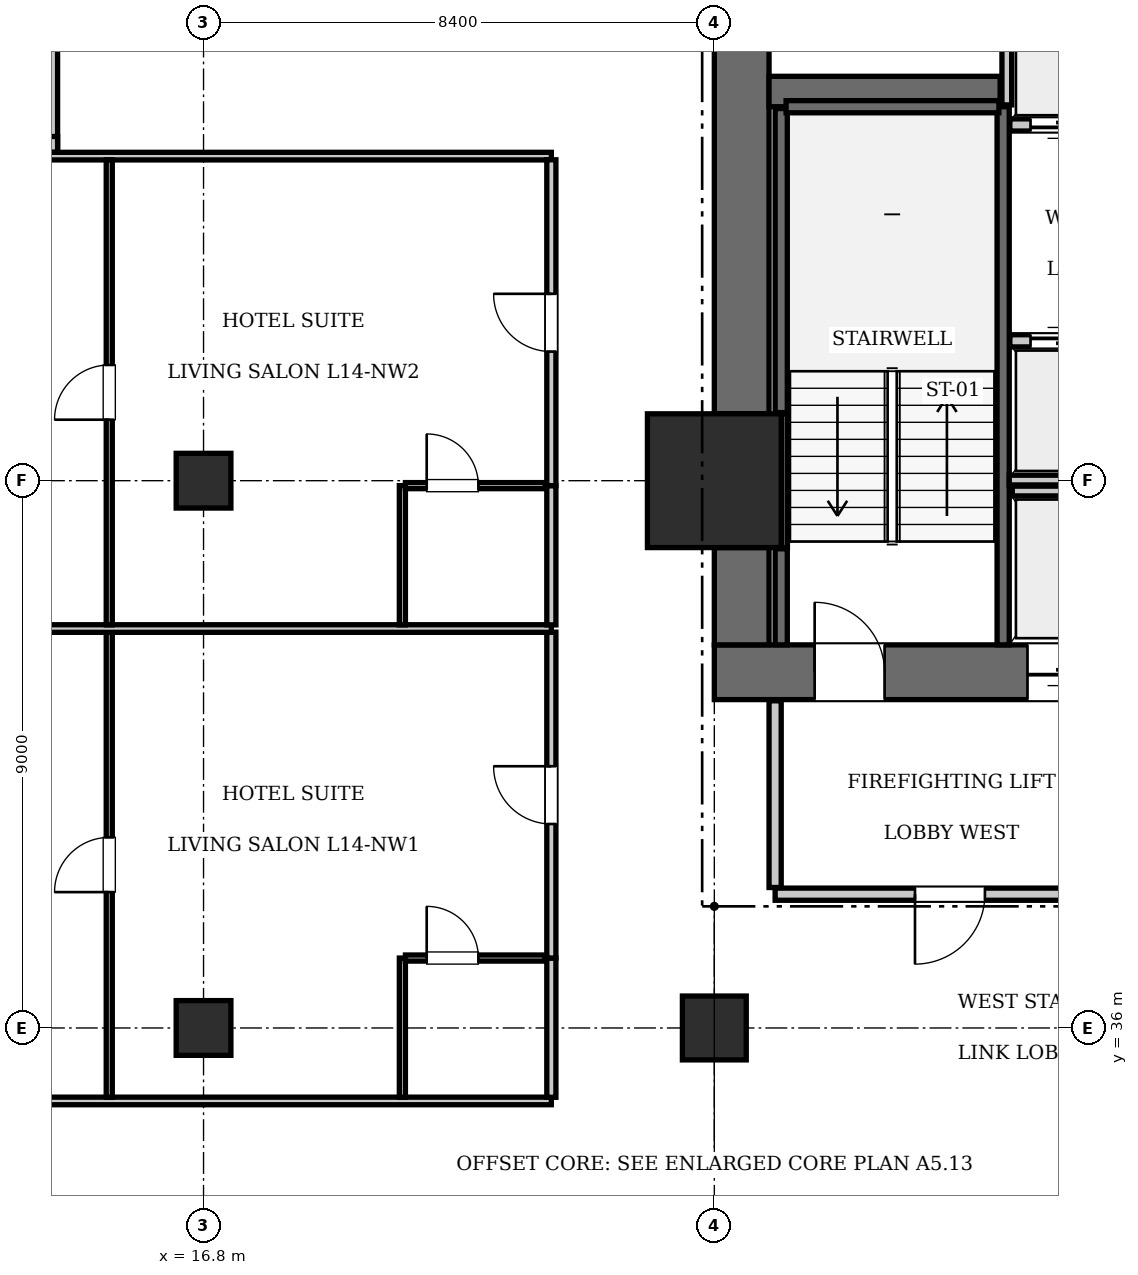
"""IFC4 building model, lengths in metres.
Left out: names, types, materials, properties, quantities, classifications, styles, units other than length and angle.
Written with IfcOpenShell. Run it as: python <this file> out.ifc"""

import sys

from ifc_helpers import new_model, si_unit, direction, frame, frame_2d, origin, origin_2d, place, context, subcontext, project, spatial, rectangle, extrude, element, fill, save


model = new_model("IFC4")
c1 = context("Model", 3, precision=1e-05, world=origin(), true_north=direction((0.0, 1.0)))
c2 = subcontext(c1, "Body", "Model", "MODEL_VIEW")
j1 = project(units=[si_unit("LENGTHUNIT", "METRE"), si_unit("PLANEANGLEUNIT", "RADIAN")], contexts=[c1])
p1 = place(None, origin())
s1 = spatial("IfcSite", under=j1, at=p1, CompositionType="ELEMENT")
p2 = place(p1, origin())
s2 = spatial("IfcBuilding", under=s1, at=p2, CompositionType="ELEMENT")
p3 = place(p2, frame((0.0, 0.0, 61.6)))
s3 = spatial("IfcBuildingStorey", under=s2, at=p3, CompositionType="ELEMENT", Elevation=61.6)
p4 = place(p3, frame((25.2, 45.0, 0.0), z_axis=(0.0, 0.0, 1.0), x_axis=(1.0, 0.0, 0.0)))
e1 = element("IfcColumn", 1, at=p4, inside=s3, PredefinedType="COLUMN", context=c2, shape_type="SweptSolid", body=[
    extrude(rectangle(XDim=2.2, YDim=2.2, at=origin_2d()), origin(), (0.0, 0.0, 1.0), 3.85),
])
p5 = place(p3, frame((25.2, 41.85, 0.0), z_axis=(0.0, 0.0, 1.0), x_axis=(1.0, 0.0, 0.0)))
e2 = element("IfcWall", 2, at=p5, inside=s3, PredefinedType="SHEAR", context=c2, shape_type="SweptSolid", body=[
    extrude(rectangle(XDim=6.8, YDim=0.9, at=frame_2d((3.4, 0.0))), origin(), (0.0, 0.0, 1.0), 3.85),
])
p6 = place(p5, frame((1.65, 0.0, 0.0)))
e3 = element("IfcOpeningElement", 3, at=p6, cuts=e2, PredefinedType="OPENING", context=c2, shape_type="SweptSolid", body=[
    extrude(rectangle(XDim=1.15, YDim=2.15, at=frame_2d((0.575, 1.075))), frame((0.0, 0.46, 0.0), z_axis=(0.0, -1.0, 0.0), x_axis=(1.0, 0.0, 0.0)), (0.0, 0.0, 1.0), 0.92),
])
p7 = place(p5, frame((5.15, 0.0, 0.0)))
e4 = element("IfcOpeningElement", 4, at=p7, cuts=e2, PredefinedType="OPENING", context=c2, shape_type="SweptSolid", body=[
    extrude(rectangle(XDim=1.1, YDim=2.2, at=frame_2d((0.55, 1.1))), frame((0.0, 0.46, 0.0), z_axis=(0.0, -1.0, 0.0), x_axis=(1.0, 0.0, 0.0)), (0.0, 0.0, 1.0), 0.92),
])
p8 = place(p3, frame((25.65, 42.3, 0.0), z_axis=(0.0, 0.0, 1.0), x_axis=(0.0, 1.0, 0.0)))
e5 = element("IfcWall", 5, at=p8, inside=s3, PredefinedType="SHEAR", context=c2, shape_type="SweptSolid", body=[
    extrude(rectangle(XDim=1.6, YDim=0.9, at=frame_2d((0.8, 0.0))), origin(), (0.0, 0.0, 1.0), 3.85),
])
p9 = place(p3, frame((25.65, 46.1, 0.0), z_axis=(0.0, 0.0, 1.0), x_axis=(0.0, 1.0, 0.0)))
e6 = element("IfcWall", 6, at=p9, inside=s3, PredefinedType="SHEAR", context=c2, shape_type="SweptSolid", body=[
    extrude(rectangle(XDim=7.0, YDim=0.9, at=frame_2d((3.5, 0.0))), origin(), (0.0, 0.0, 1.0), 3.85),
])
p10 = place(p3, frame((26.1, 51.4, 0.0), z_axis=(0.0, 0.0, 1.0), x_axis=(1.0, 0.0, 0.0)))
e7 = element("IfcWall", 7, at=p10, inside=s3, PredefinedType="SHEAR", context=c2, shape_type="SweptSolid", body=[
    extrude(rectangle(XDim=3.8, YDim=0.5, at=frame_2d((1.9, 0.0))), origin(), (0.0, 0.0, 1.0), 3.85),
])
p11 = place(p3, frame((25.2, 36.0, 0.0), z_axis=(0.0, 0.0, 1.0), x_axis=(1.0, 0.0, 0.0)))
e8 = element("IfcColumn", 8, at=p11, inside=s3, PredefinedType="COLUMN", context=c2, shape_type="SweptSolid", body=[
    extrude(rectangle(XDim=1.05, YDim=1.05, at=origin_2d()), origin(), (0.0, 0.0, 1.0), 3.85),
])
for number, where, z_axis, x_axis in (
    (9, (16.8, 36.0, 0.0), (0.0, 0.0, 1.0), (1.0, 0.0, 0.0)),
    (10, (16.8, 45.0, 0.0), (0.0, 0.0, 1.0), (1.0, 0.0, 0.0)),
):
    element("IfcColumn", number, at=place(p3, frame(where, z_axis=z_axis, x_axis=x_axis)), inside=s3, PredefinedType="COLUMN", context=c2, shape_type="SweptSolid", body=[
        extrude(rectangle(XDim=0.9, YDim=0.9, at=origin_2d()), origin(), (0.0, 0.0, 1.0), 3.85),
    ])
p12 = place(p3, frame((29.95, 42.3, 0.0), z_axis=(0.0, 0.0, 1.0), x_axis=(0.0, 1.0, 0.0)))
e11 = element("IfcWall", 11, at=p12, inside=s3, PredefinedType="SOLIDWALL", context=c2, shape_type="SweptSolid", body=[
    extrude(rectangle(XDim=8.85, YDim=0.2, at=frame_2d((4.425, 0.0))), origin(), (0.0, 0.0, 1.0), 3.61),
])
p13 = place(p3, frame((26.3, 42.3, 0.0), z_axis=(0.0, 0.0, 1.0), x_axis=(0.0, 1.0, 0.0)))
e12 = element("IfcWall", 12, at=p13, inside=s3, PredefinedType="SOLIDWALL", context=c2, shape_type="SweptSolid", body=[
    extrude(rectangle(XDim=1.58, YDim=0.2, at=frame_2d((0.79, 0.0))), origin(), (0.0, 0.0, 1.0), 3.61),
])
p14 = place(p3, frame((26.3, 46.12, 0.0), z_axis=(0.0, 0.0, 1.0), x_axis=(0.0, 1.0, 0.0)))
e13 = element("IfcWall", 13, at=p14, inside=s3, PredefinedType="SOLIDWALL", context=c2, shape_type="SweptSolid", body=[
    extrude(rectangle(XDim=5.0, YDim=0.2, at=frame_2d((2.5, 0.0))), origin(), (0.0, 0.0, 1.0), 3.61),
])
p15 = place(p3, frame((26.38, 51.15, 0.0), z_axis=(0.0, 0.0, 1.0), x_axis=(1.0, 0.0, 0.0)))
e14 = element("IfcWall", 14, at=p15, inside=s3, PredefinedType="SOLIDWALL", context=c2, shape_type="SweptSolid", body=[
    extrude(rectangle(XDim=3.5, YDim=0.2, at=frame_2d((1.75, 0.0))), origin(), (0.0, 0.0, 1.0), 3.61),
])
p16 = place(p3, frame((26.352, 43.9, 0.0), z_axis=(0.0, 0.0, 1.0), x_axis=(0.0, 1.0, 0.0)))
e15 = element("IfcWall", 15, at=p16, inside=s3, PredefinedType="SOLIDWALL", context=c2, shape_type="SweptSolid", body=[
    extrude(rectangle(XDim=2.2, YDim=0.1, at=frame_2d((1.1, 0.0))), origin(), (0.0, 0.0, 1.0), 3.61),
])
p17 = place(p3, frame((30.06, 47.3, 0.0), z_axis=(0.0, 0.0, 1.0), x_axis=(1.0, 0.0, 0.0)))
e16 = element("IfcWall", 16, at=p17, inside=s3, PredefinedType="SOLIDWALL", context=c2, shape_type="SweptSolid", body=[
    extrude(rectangle(XDim=1.68, YDim=0.2, at=frame_2d((0.84, 0.0))), origin(), (0.0, 0.0, 1.0), 3.61),
])
p18 = place(p17, frame((0.34, 0.0, 0.0)))
e17 = element("IfcOpeningElement", 17, at=p18, cuts=e16, PredefinedType="OPENING", context=c2, shape_type="SweptSolid", body=[
    extrude(rectangle(XDim=1.0, YDim=2.15, at=frame_2d((0.5, 1.075))), frame((0.0, 0.11, 0.0), z_axis=(0.0, -1.0, 0.0), x_axis=(1.0, 0.0, 0.0)), (0.0, 0.0, 1.0), 0.22),
])
p19 = place(p3, frame((30.06, 50.85, 0.0), z_axis=(0.0, 0.0, 1.0), x_axis=(1.0, 0.0, 0.0)))
e18 = element("IfcWall", 18, at=p19, inside=s3, PredefinedType="SOLIDWALL", context=c2, shape_type="SweptSolid", body=[
    extrude(rectangle(XDim=1.68, YDim=0.2, at=frame_2d((0.84, 0.0))), origin(), (0.0, 0.0, 1.0), 3.61),
])
p20 = place(p19, frame((0.34, 0.0, 0.0)))
e19 = element("IfcOpeningElement", 19, at=p20, cuts=e18, PredefinedType="OPENING", context=c2, shape_type="SweptSolid", body=[
    extrude(rectangle(XDim=1.0, YDim=2.15, at=frame_2d((0.5, 1.075))), frame((0.0, 0.11, 0.0), z_axis=(0.0, -1.0, 0.0), x_axis=(1.0, 0.0, 0.0)), (0.0, 0.0, 1.0), 0.22),
])
p21 = place(p3, frame((30.1, 44.83, 0.0), z_axis=(0.0, 0.0, 1.0), x_axis=(1.0, 0.0, 0.0)))
e20 = element("IfcWall", 20, at=p21, inside=s3, PredefinedType="SOLIDWALL", context=c2, shape_type="SweptSolid", body=[
    extrude(rectangle(XDim=1.6, YDim=0.16, at=frame_2d((0.8, 0.0))), origin(), (0.0, 0.0, 1.0), 3.61),
])
p22 = place(p3, frame((30.05, 45.01, 0.0), z_axis=(0.0, 0.0, 1.0), x_axis=(1.0, 0.0, 0.0)))
e21 = element("IfcWall", 21, at=p22, inside=s3, PredefinedType="SOLIDWALL", context=c2, shape_type="SweptSolid", body=[
    extrude(rectangle(XDim=3.45, YDim=0.16, at=frame_2d((1.725, 0.0))), origin(), (0.0, 0.0, 1.0), 3.61),
])
p23 = place(p3, frame((30.01, 51.18, 0.0), z_axis=(0.0, 0.0, 1.0), x_axis=(0.0, 1.0, 0.0)))
e22 = element("IfcWall", 22, at=p23, inside=s3, PredefinedType="SOLIDWALL", context=c2, shape_type="SweptSolid", body=[
    extrude(rectangle(XDim=1.92, YDim=0.16, at=frame_2d((0.96, 0.0))), origin(), (0.0, 0.0, 1.0), 3.61),
])
p24 = place(p3, frame((14.27, 50.4, 0.0), z_axis=(0.0, 0.0, 1.0), x_axis=(0.0, 1.0, 0.0)))
e23 = element("IfcWall", 23, at=p24, inside=s3, PredefinedType="SOLIDWALL", context=c2, shape_type="SweptSolid", body=[
    extrude(rectangle(XDim=3.6, YDim=0.26, at=frame_2d((1.8, 0.0))), origin(), (0.0, 0.0, 1.0), 3.61),
])
p25 = place(p3, frame((10.8, 50.53, 0.0), z_axis=(0.0, 0.0, 1.0), x_axis=(1.0, 0.0, 0.0)))
e24 = element("IfcWall", 24, at=p25, inside=s3, PredefinedType="SOLIDWALL", context=c2, shape_type="SweptSolid", body=[
    extrude(rectangle(XDim=3.6, YDim=0.26, at=frame_2d((1.8, 0.0))), origin(), (0.0, 0.0, 1.0), 3.61),
])
p26 = place(p3, frame((26.2, 38.2, 0.0), z_axis=(0.0, 0.0, 1.0), x_axis=(1.0, 0.0, 0.0)))
e25 = element("IfcWall", 25, at=p26, inside=s3, PredefinedType="PARTITIONING", context=c2, shape_type="SweptSolid", body=[
    extrude(rectangle(XDim=5.8, YDim=0.2, at=frame_2d((2.9, 0.0))), origin(), (0.0, 0.0, 1.0), 3.61),
])
p27 = place(p26, frame((2.3, 0.0, 0.0)))
e26 = element("IfcOpeningElement", 26, at=p27, cuts=e25, PredefinedType="OPENING", context=c2, shape_type="SweptSolid", body=[
    extrude(rectangle(XDim=1.15, YDim=2.15, at=frame_2d((0.575, 1.075))), frame((0.0, 0.11, 0.0), z_axis=(0.0, -1.0, 0.0), x_axis=(1.0, 0.0, 0.0)), (0.0, 0.0, 1.0), 0.22),
])
p28 = place(p3, frame((26.2, 38.31, 0.0), z_axis=(0.0, 0.0, 1.0), x_axis=(0.0, 1.0, 0.0)))
e27 = element("IfcWall", 27, at=p28, inside=s3, PredefinedType="PARTITIONING", context=c2, shape_type="SweptSolid", body=[
    extrude(rectangle(XDim=3.07, YDim=0.2, at=frame_2d((1.535, 0.0))), origin(), (0.0, 0.0, 1.0), 3.61),
])
p29 = place(p3, frame((10.9, 34.8, 0.0), z_axis=(0.0, 0.0, 1.0), x_axis=(1.0, 0.0, 0.0)))
e28 = element("IfcWall", 28, at=p29, inside=s3, PredefinedType="PARTITIONING", context=c2, shape_type="SweptSolid", body=[
    extrude(rectangle(XDim=11.62, YDim=0.125, at=frame_2d((5.81, 0.0))), origin(), (0.0, 0.0, 1.0), 3.61),
])
p30 = place(p3, frame((14.14, 50.337, 0.0), z_axis=(0.0, 0.0, 1.0), x_axis=(1.0, 0.0, 0.0)))
e29 = element("IfcWall", 29, at=p30, inside=s3, PredefinedType="PARTITIONING", context=c2, shape_type="SweptSolid", body=[
    extrude(rectangle(XDim=8.38, YDim=0.125, at=frame_2d((4.19, 0.0))), origin(), (0.0, 0.0, 1.0), 3.61),
])
p31 = place(p3, frame((22.52, 34.86, 0.0), z_axis=(0.0, 0.0, 1.0), x_axis=(0.0, 1.0, 0.0)))
e30 = element("IfcWall", 30, at=p31, inside=s3, PredefinedType="PARTITIONING", context=c2, shape_type="SweptSolid", body=[
    extrude(rectangle(XDim=2.29, YDim=0.15, at=frame_2d((1.145, 0.0))), origin(), (0.0, 0.0, 1.0), 3.61),
])
p32 = place(p3, frame((22.52, 37.15, 0.0), z_axis=(0.0, 0.0, 1.0), x_axis=(0.0, 1.0, 0.0)))
e31 = element("IfcWall", 31, at=p32, inside=s3, PredefinedType="PARTITIONING", context=c2, shape_type="SweptSolid", body=[
    extrude(rectangle(XDim=5.359, YDim=0.15, at=frame_2d((2.679, 0.0))), origin(), (0.0, 0.0, 1.0), 3.61),
])
p33 = place(p32, frame((2.204, 0.0, 0.0)))
e32 = element("IfcOpeningElement", 32, at=p33, cuts=e31, PredefinedType="OPENING", context=c2, shape_type="SweptSolid", body=[
    extrude(rectangle(XDim=0.95, YDim=2.15, at=frame_2d((0.475, 1.075))), frame((0.0, 0.085, 0.0), z_axis=(0.0, -1.0, 0.0), x_axis=(1.0, 0.0, 0.0)), (0.0, 0.0, 1.0), 0.17),
])
p34 = place(p3, frame((20.07, 34.86, 0.0), z_axis=(0.0, 0.0, 1.0), x_axis=(0.0, 1.0, 0.0)))
e33 = element("IfcWall", 33, at=p34, inside=s3, PredefinedType="PARTITIONING", context=c2, shape_type="SweptSolid", body=[
    extrude(rectangle(XDim=2.29, YDim=0.1, at=frame_2d((1.145, 0.0))), origin(), (0.0, 0.0, 1.0), 3.61),
])
p35 = place(p3, frame((20.12, 37.15, 0.0), z_axis=(0.0, 0.0, 1.0), x_axis=(1.0, 0.0, 0.0)))
e34 = element("IfcWall", 34, at=p35, inside=s3, PredefinedType="PARTITIONING", context=c2, shape_type="SweptSolid", body=[
    extrude(rectangle(XDim=2.3, YDim=0.1, at=frame_2d((1.15, 0.0))), origin(), (0.0, 0.0, 1.0), 3.61),
])
p36 = place(p35, frame((0.35, 0.0, 0.0)))
e35 = element("IfcOpeningElement", 35, at=p36, cuts=e34, PredefinedType="OPENING", context=c2, shape_type="SweptSolid", body=[
    extrude(rectangle(XDim=0.85, YDim=2.1, at=frame_2d((0.425, 1.05))), frame((0.0, 0.06, 0.0), z_axis=(0.0, -1.0, 0.0), x_axis=(1.0, 0.0, 0.0)), (0.0, 0.0, 1.0), 0.12),
])
p37 = place(p3, frame((15.25, 34.86, 0.0), z_axis=(0.0, 0.0, 1.0), x_axis=(0.0, 1.0, 0.0)))
e36 = element("IfcWall", 36, at=p37, inside=s3, PredefinedType="PARTITIONING", context=c2, shape_type="SweptSolid", body=[
    extrude(rectangle(XDim=7.649, YDim=0.1, at=frame_2d((3.824, 0.0))), origin(), (0.0, 0.0, 1.0), 3.61),
])
p38 = place(p37, frame((3.374, 0.0, 0.0)))
e37 = element("IfcOpeningElement", 37, at=p38, cuts=e36, PredefinedType="OPENING", context=c2, shape_type="SweptSolid", body=[
    extrude(rectangle(XDim=0.9, YDim=2.1, at=frame_2d((0.45, 1.05))), frame((0.0, 0.06, 0.0), z_axis=(0.0, -1.0, 0.0), x_axis=(1.0, 0.0, 0.0)), (0.0, 0.0, 1.0), 0.12),
])
p39 = place(p3, frame((10.9, 42.569, 0.0), z_axis=(0.0, 0.0, 1.0), x_axis=(1.0, 0.0, 0.0)))
e38 = element("IfcWall", 38, at=p39, inside=s3, PredefinedType="PARTITIONING", context=c2, shape_type="SweptSolid", body=[
    extrude(rectangle(XDim=11.62, YDim=0.125, at=frame_2d((5.81, 0.0))), origin(), (0.0, 0.0, 1.0), 3.61),
])
p40 = place(p3, frame((22.52, 42.629, 0.0), z_axis=(0.0, 0.0, 1.0), x_axis=(0.0, 1.0, 0.0)))
e39 = element("IfcWall", 39, at=p40, inside=s3, PredefinedType="PARTITIONING", context=c2, shape_type="SweptSolid", body=[
    extrude(rectangle(XDim=2.29, YDim=0.15, at=frame_2d((1.145, 0.0))), origin(), (0.0, 0.0, 1.0), 3.61),
])
p41 = place(p3, frame((22.52, 44.919, 0.0), z_axis=(0.0, 0.0, 1.0), x_axis=(0.0, 1.0, 0.0)))
e40 = element("IfcWall", 40, at=p41, inside=s3, PredefinedType="PARTITIONING", context=c2, shape_type="SweptSolid", body=[
    extrude(rectangle(XDim=5.359, YDim=0.15, at=frame_2d((2.679, 0.0))), origin(), (0.0, 0.0, 1.0), 3.61),
])
p42 = place(p41, frame((2.204, 0.0, 0.0)))
e41 = element("IfcOpeningElement", 41, at=p42, cuts=e40, PredefinedType="OPENING", context=c2, shape_type="SweptSolid", body=[
    extrude(rectangle(XDim=0.95, YDim=2.15, at=frame_2d((0.475, 1.075))), frame((0.0, 0.085, 0.0), z_axis=(0.0, -1.0, 0.0), x_axis=(1.0, 0.0, 0.0)), (0.0, 0.0, 1.0), 0.17),
])
p43 = place(p3, frame((20.07, 42.629, 0.0), z_axis=(0.0, 0.0, 1.0), x_axis=(0.0, 1.0, 0.0)))
e42 = element("IfcWall", 42, at=p43, inside=s3, PredefinedType="PARTITIONING", context=c2, shape_type="SweptSolid", body=[
    extrude(rectangle(XDim=2.29, YDim=0.1, at=frame_2d((1.145, 0.0))), origin(), (0.0, 0.0, 1.0), 3.61),
])
p44 = place(p3, frame((20.12, 44.919, 0.0), z_axis=(0.0, 0.0, 1.0), x_axis=(1.0, 0.0, 0.0)))
e43 = element("IfcWall", 43, at=p44, inside=s3, PredefinedType="PARTITIONING", context=c2, shape_type="SweptSolid", body=[
    extrude(rectangle(XDim=2.3, YDim=0.1, at=frame_2d((1.15, 0.0))), origin(), (0.0, 0.0, 1.0), 2.988),
])
p45 = place(p44, frame((0.35, 0.0, 0.0)))
e44 = element("IfcOpeningElement", 44, at=p45, cuts=e43, PredefinedType="OPENING", context=c2, shape_type="SweptSolid", body=[
    extrude(rectangle(XDim=0.85, YDim=2.1, at=frame_2d((0.425, 1.05))), frame((0.0, 0.06, 0.0), z_axis=(0.0, -1.0, 0.0), x_axis=(1.0, 0.0, 0.0)), (0.0, 0.0, 1.0), 0.12),
])
p46 = place(p3, frame((15.25, 42.629, 0.0), z_axis=(0.0, 0.0, 1.0), x_axis=(0.0, 1.0, 0.0)))
e45 = element("IfcWall", 45, at=p46, inside=s3, PredefinedType="PARTITIONING", context=c2, shape_type="SweptSolid", body=[
    extrude(rectangle(XDim=7.649, YDim=0.1, at=frame_2d((3.824, 0.0))), origin(), (0.0, 0.0, 1.0), 3.61),
])
p47 = place(p46, frame((3.375, 0.0, 0.0)))
e46 = element("IfcOpeningElement", 46, at=p47, cuts=e45, PredefinedType="OPENING", context=c2, shape_type="SweptSolid", body=[
    extrude(rectangle(XDim=0.9, YDim=2.1, at=frame_2d((0.45, 1.05))), frame((0.0, 0.06, 0.0), z_axis=(0.0, -1.0, 0.0), x_axis=(1.0, 0.0, 0.0)), (0.0, 0.0, 1.0), 0.12),
])
p48 = place(p6, origin())
e47 = element("IfcDoor", 47, at=p48, inside=s3, OperationType="SINGLE_SWING_LEFT", PredefinedType="DOOR", context=c2, shape_type="SweptSolid", body=[
    extrude(rectangle(XDim=1.15, YDim=2.15, at=frame_2d((0.575, 1.075))), frame((0.0, 0.025, 0.0), z_axis=(0.0, -1.0, 0.0), x_axis=(1.0, 0.0, 0.0)), (0.0, 0.0, 1.0), 0.05),
])
fill(e3, e47)
p49 = place(p18, origin())
e48 = element("IfcDoor", 48, at=p49, inside=s3, OperationType="SLIDING_TO_LEFT", PredefinedType="DOOR", context=c2, shape_type="SweptSolid", body=[
    extrude(rectangle(XDim=1.0, YDim=2.15, at=frame_2d((0.5, 1.075))), frame((0.0, 0.025, 0.0), z_axis=(0.0, -1.0, 0.0), x_axis=(1.0, 0.0, 0.0)), (0.0, 0.0, 1.0), 0.05),
])
fill(e17, e48)
p50 = place(p20, frame((1.0, 0.0, 0.0), z_axis=(0.0, 0.0, 1.0), x_axis=(-1.0, 0.0, 0.0)))
e49 = element("IfcDoor", 49, at=p50, inside=s3, OperationType="SLIDING_TO_LEFT", PredefinedType="DOOR", context=c2, shape_type="SweptSolid", body=[
    extrude(rectangle(XDim=1.0, YDim=2.15, at=frame_2d((0.5, 1.075))), frame((0.0, 0.025, 0.0), z_axis=(0.0, -1.0, 0.0), x_axis=(1.0, 0.0, 0.0)), (0.0, 0.0, 1.0), 0.05),
])
fill(e19, e49)
p51 = place(p7, frame((1.1, 0.0, 0.0), z_axis=(0.0, 0.0, 1.0), x_axis=(-1.0, 0.0, 0.0)))
e50 = element("IfcDoor", 50, at=p51, inside=s3, OperationType="SLIDING_TO_LEFT", PredefinedType="DOOR", context=c2, shape_type="SweptSolid", body=[
    extrude(rectangle(XDim=1.1, YDim=2.2, at=frame_2d((0.55, 1.1))), frame((0.0, 0.025, 0.0), z_axis=(0.0, -1.0, 0.0), x_axis=(1.0, 0.0, 0.0)), (0.0, 0.0, 1.0), 0.05),
])
fill(e4, e50)
p52 = place(p27, frame((1.15, 0.0, 0.0), z_axis=(0.0, 0.0, 1.0), x_axis=(-1.0, 0.0, 0.0)))
e51 = element("IfcDoor", 51, at=p52, inside=s3, OperationType="SINGLE_SWING_RIGHT", PredefinedType="DOOR", context=c2, shape_type="SweptSolid", body=[
    extrude(rectangle(XDim=1.15, YDim=2.15, at=frame_2d((0.575, 1.075))), frame((0.0, 0.025, 0.0), z_axis=(0.0, -1.0, 0.0), x_axis=(1.0, 0.0, 0.0)), (0.0, 0.0, 1.0), 0.05),
])
fill(e26, e51)
p53 = place(p36, origin())
e52 = element("IfcDoor", 52, at=p53, inside=s3, OperationType="SINGLE_SWING_LEFT", PredefinedType="DOOR", context=c2, shape_type="SweptSolid", body=[
    extrude(rectangle(XDim=0.85, YDim=2.1, at=frame_2d((0.425, 1.05))), frame((0.0, 0.025, 0.0), z_axis=(0.0, -1.0, 0.0), x_axis=(1.0, 0.0, 0.0)), (0.0, 0.0, 1.0), 0.05),
])
fill(e35, e52)
p54 = place(p33, origin())
e53 = element("IfcDoor", 53, at=p54, inside=s3, OperationType="SINGLE_SWING_RIGHT", PredefinedType="DOOR", context=c2, shape_type="SweptSolid", body=[
    extrude(rectangle(XDim=0.95, YDim=2.15, at=frame_2d((0.475, 1.075))), frame((0.0, 0.025, 0.0), z_axis=(0.0, -1.0, 0.0), x_axis=(1.0, 0.0, 0.0)), (0.0, 0.0, 1.0), 0.05),
])
fill(e32, e53)
p55 = place(p38, origin())
e54 = element("IfcDoor", 54, at=p55, inside=s3, OperationType="SINGLE_SWING_LEFT", PredefinedType="DOOR", context=c2, shape_type="SweptSolid", body=[
    extrude(rectangle(XDim=0.9, YDim=2.1, at=frame_2d((0.45, 1.05))), frame((0.0, 0.025, 0.0), z_axis=(0.0, -1.0, 0.0), x_axis=(1.0, 0.0, 0.0)), (0.0, 0.0, 1.0), 0.05),
])
fill(e37, e54)
p56 = place(p45, origin())
e55 = element("IfcDoor", 55, at=p56, inside=s3, OperationType="SINGLE_SWING_LEFT", PredefinedType="DOOR", context=c2, shape_type="SweptSolid", body=[
    extrude(rectangle(XDim=0.85, YDim=2.1, at=frame_2d((0.425, 1.05))), frame((0.0, 0.025, 0.0), z_axis=(0.0, -1.0, 0.0), x_axis=(1.0, 0.0, 0.0)), (0.0, 0.0, 1.0), 0.05),
])
fill(e44, e55)
p57 = place(p42, origin())
e56 = element("IfcDoor", 56, at=p57, inside=s3, OperationType="SINGLE_SWING_RIGHT", PredefinedType="DOOR", context=c2, shape_type="SweptSolid", body=[
    extrude(rectangle(XDim=0.95, YDim=2.15, at=frame_2d((0.475, 1.075))), frame((0.0, 0.025, 0.0), z_axis=(0.0, -1.0, 0.0), x_axis=(1.0, 0.0, 0.0)), (0.0, 0.0, 1.0), 0.05),
])
fill(e41, e56)
p58 = place(p47, origin())
e57 = element("IfcDoor", 57, at=p58, inside=s3, OperationType="SINGLE_SWING_LEFT", PredefinedType="DOOR", context=c2, shape_type="SweptSolid", body=[
    extrude(rectangle(XDim=0.9, YDim=2.1, at=frame_2d((0.45, 1.05))), frame((0.0, 0.025, 0.0), z_axis=(0.0, -1.0, 0.0), x_axis=(1.0, 0.0, 0.0)), (0.0, 0.0, 1.0), 0.05),
])
fill(e46, e57)
save(model, sys.argv[1])
